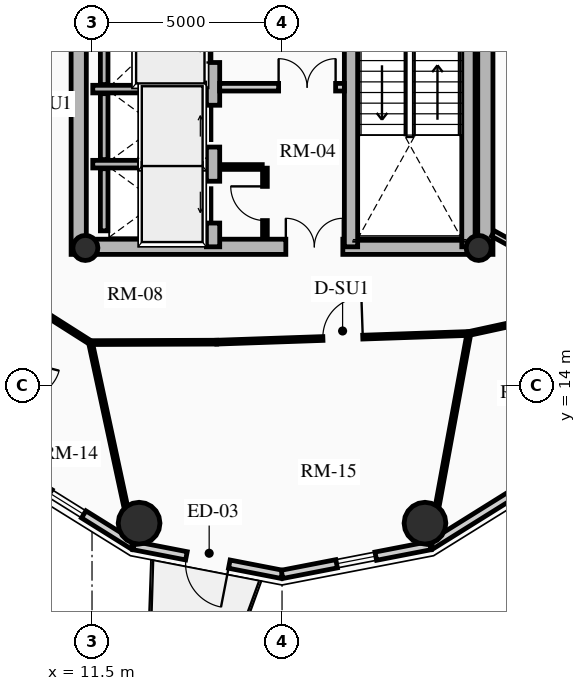
"""IFC4 building model, lengths in metres.
Left out: names, types, materials, properties, quantities, classifications, styles, units other than length and angle.
Written with IfcOpenShell. Run it as: python <this file> out.ifc"""

import sys

from ifc_helpers import new_model, si_unit, direction, frame, frame_2d, origin, origin_2d, place, context, subcontext, project, spatial, rectangle, circle, hollow_circle, extrude, source, transform, mapped, element, fill, save


model = new_model("IFC4")
c1 = context("Model", 3, precision=1e-05, world=origin(), true_north=direction((0.0, 1.0)))
c2 = subcontext(c1, "Body", "Model", "MODEL_VIEW")
j1 = project(units=[si_unit("LENGTHUNIT", "METRE"), si_unit("PLANEANGLEUNIT", "RADIAN")], contexts=[c1])
p1 = place(None, origin())
s1 = spatial("IfcSite", under=j1, at=p1, CompositionType="ELEMENT")
p2 = place(p1, origin())
s2 = spatial("IfcBuilding", under=s1, at=p2, CompositionType="ELEMENT")
p3 = place(p2, frame((0.0, 0.0, 232.45)))
s3 = spatial("IfcBuildingStorey", under=s2, at=p3, CompositionType="ELEMENT", Elevation=232.45)
for number, where, z_axis, x_axis in (
    (1, (11.15, 17.45, 0.0), (0.0, 0.0, 1.0), (0.0, 1.0, 0.0)),
    (2, (21.85, 17.45, 0.0), (0.0, 0.0, 1.0), (0.0, 1.0, 0.0)),
):
    element("IfcWall", number, at=place(p3, frame(where, z_axis=z_axis, x_axis=x_axis)), inside=s3, PredefinedType="SHEAR", context=c2, shape_type="SweptSolid", body=[
        extrude(rectangle(XDim=14.1, YDim=0.4, at=frame_2d((7.05, 0.0))), origin(), (0.0, 0.0, 1.0), 3.2),
    ])
p4 = place(p3, frame((11.15, 17.65, 0.0), z_axis=(0.0, 0.0, 1.0), x_axis=(1.0, 0.0, 0.0)))
e3 = element("IfcWall", 3, at=p4, inside=s3, PredefinedType="SHEAR", context=c2, shape_type="SweptSolid", body=[
    extrude(rectangle(XDim=10.7, YDim=0.4, at=frame_2d((5.35, 0.0))), origin(), (0.0, 0.0, 1.0), 3.2),
])
m1 = source(origin(), c2, "Body", "SweptSolid", [
    extrude(rectangle(XDim=1.5, YDim=2.02, at=frame_2d((0.75, 1.01))), frame((0.0, 0.21, 0.0), z_axis=(0.0, -1.0, 0.0), x_axis=(1.0, 0.0, 0.0)), (0.0, 0.0, 1.0), 0.42),
])
p5 = place(p4, frame((5.45, 0.0, 0.0)))
e4 = element("IfcOpeningElement", 4, at=p5, cuts=e3, PredefinedType="OPENING", context=c2, shape_type="MappedRepresentation", body=[
    mapped(m1, transform((0.0, 0.0, 0.0), x_axis=(1.0, 0.0, 0.0), y_axis=(0.0, 1.0, 0.0), z_axis=(0.0, 0.0, 1.0), scale=1.0)),
])
p6 = place(p3, frame((14.685, 17.65, 0.0), z_axis=(0.0, 0.0, 1.0), x_axis=(0.0, 1.0, 0.0)))
e5 = element("IfcWall", 5, at=p6, inside=s3, PredefinedType="SHEAR", context=c2, shape_type="SweptSolid", body=[
    extrude(rectangle(XDim=13.7, YDim=0.35, at=frame_2d((6.85, 0.0))), origin(), (0.0, 0.0, 1.0), 3.2),
])
m2 = source(origin(), c2, "Body", "SweptSolid", [
    extrude(rectangle(XDim=1.1, YDim=2.015, at=frame_2d((0.55, 1.007))), frame((0.0, 0.185, 0.0), z_axis=(0.0, -1.0, 0.0), x_axis=(1.0, 0.0, 0.0)), (0.0, 0.0, 1.0), 0.37),
])
p7 = place(p6, frame((4.85, 0.0, 0.0)))
e6 = element("IfcOpeningElement", 6, at=p7, cuts=e5, PredefinedType="OPENING", context=c2, shape_type="MappedRepresentation", body=[
    mapped(m2, transform((0.0, 0.0, 0.0), x_axis=(1.0, 0.0, 0.0), y_axis=(0.0, 1.0, 0.0), z_axis=(0.0, 0.0, 1.0), scale=1.0)),
])
p8 = place(p6, frame((0.625, 0.0, 0.0)))
e7 = element("IfcOpeningElement", 7, at=p8, cuts=e5, PredefinedType="OPENING", context=c2, shape_type="MappedRepresentation", body=[
    mapped(m2, transform((0.0, 0.0, 0.0), x_axis=(1.0, 0.0, 0.0), y_axis=(0.0, 1.0, 0.0), z_axis=(0.0, 0.0, 1.0), scale=1.0)),
])
p9 = place(p6, frame((2.625, 0.0, 0.0)))
e8 = element("IfcOpeningElement", 8, at=p9, cuts=e5, PredefinedType="OPENING", context=c2, shape_type="MappedRepresentation", body=[
    mapped(m2, transform((0.0, 0.0, 0.0), x_axis=(1.0, 0.0, 0.0), y_axis=(0.0, 1.0, 0.0), z_axis=(0.0, 0.0, 1.0), scale=1.0)),
])
m3 = source(origin(), c2, "Body", "SweptSolid", [
    extrude(rectangle(XDim=1.15, YDim=2.02, at=frame_2d((0.575, 1.01))), frame((0.0, 0.185, 0.0), z_axis=(0.0, -1.0, 0.0), x_axis=(1.0, 0.0, 0.0)), (0.0, 0.0, 1.0), 0.37),
])
p10 = place(p6, frame((7.27, 0.0, 0.0)))
e9 = element("IfcOpeningElement", 9, at=p10, cuts=e5, PredefinedType="OPENING", context=c2, shape_type="MappedRepresentation", body=[
    mapped(m3, transform((0.0, 0.0, 0.0), x_axis=(1.0, 0.0, 0.0), y_axis=(0.0, 1.0, 0.0), z_axis=(0.0, 0.0, 1.0), scale=1.0)),
])
p11 = place(p3, frame((18.315, 17.65, 0.0), z_axis=(0.0, 0.0, 1.0), x_axis=(0.0, 1.0, 0.0)))
e10 = element("IfcWall", 10, at=p11, inside=s3, PredefinedType="SHEAR", context=c2, shape_type="SweptSolid", body=[
    extrude(rectangle(XDim=9.6, YDim=0.35, at=frame_2d((4.8, 0.0))), origin(), (0.0, 0.0, 1.0), 3.2),
])
p12 = place(p11, frame((5.28, 0.0, 0.0)))
e11 = element("IfcOpeningElement", 11, at=p12, cuts=e10, PredefinedType="OPENING", context=c2, shape_type="MappedRepresentation", body=[
    mapped(m3, transform((0.0, 0.0, 0.0), x_axis=(1.0, 0.0, 0.0), y_axis=(0.0, 1.0, 0.0), z_axis=(0.0, 0.0, 1.0), scale=1.0)),
])
p13 = place(p3, frame((21.405, 17.65, 0.0), z_axis=(0.0, 0.0, 1.0), x_axis=(0.0, 1.0, 0.0)))
e12 = element("IfcWall", 12, at=p13, inside=s3, PredefinedType="SHEAR", context=c2, shape_type="SweptSolid", body=[
    extrude(rectangle(XDim=6.695, YDim=0.35, at=frame_2d((3.348, 0.0))), origin(), (0.0, 0.0, 1.0), 3.2),
])
for number, where, z_axis, x_axis in (
    (13, (11.325, 17.62, 0.0), (0.0, 0.0, 1.0), (1.0, 0.0, 0.0)),
    (14, (21.675, 17.62, 0.0), (0.0, 0.0, 1.0), (1.0, 0.0, 0.0)),
):
    element("IfcColumn", number, at=place(p3, frame(where, z_axis=z_axis, x_axis=x_axis)), inside=s3, PredefinedType="COLUMN", context=c2, shape_type="SweptSolid", body=[
        extrude(hollow_circle(Radius=0.33, WallThickness=0.025, at=origin_2d()), origin(), (0.0, 0.0, 1.0), 3.2),
    ])
for number, where, z_axis, x_axis in (
    (15, (12.739, 10.377, 0.0), (0.0, 0.0, 1.0), (1.0, 0.0, 0.0)),
    (16, (20.261, 10.377, 0.0), (0.0, 0.0, 1.0), (1.0, 0.0, 0.0)),
):
    element("IfcColumn", number, at=place(p3, frame(where, z_axis=z_axis, x_axis=x_axis)), inside=s3, PredefinedType="USERDEFINED", context=c2, shape_type="SweptSolid", body=[
        extrude(circle(Radius=0.55, at=origin_2d()), origin(), (0.0, 0.0, 1.0), 3.2),
    ])
p14 = place(p3, frame((12.597, 9.787, 0.0), z_axis=(0.0, 0.0, 1.0), x_axis=(-0.848318713376, 0.529485939886, 0.0)))
e17 = element("IfcWall", 17, at=p14, inside=s3, PredefinedType="SOLIDWALL", context=c2, shape_type="SweptSolid", body=[
    extrude(rectangle(XDim=4.15, YDim=0.22, at=frame_2d((2.075, 0.0))), origin(), (0.0, 0.0, 1.0), 2.402),
])
m4 = source(origin(), c2, "Body", "SweptSolid", [
    extrude(rectangle(XDim=1.05, YDim=1.3, at=frame_2d((0.525, 0.65))), frame((0.0, 0.12, 0.0), z_axis=(0.0, -1.0, 0.0), x_axis=(1.0, 0.0, 0.0)), (0.0, 0.0, 1.0), 0.24),
])
p15 = place(p14, frame((1.55, 0.0, 0.65)))
e18 = element("IfcOpeningElement", 18, at=p15, cuts=e17, PredefinedType="OPENING", context=c2, shape_type="MappedRepresentation", body=[
    mapped(m4, transform((0.0, 0.0, 0.0), x_axis=(1.0, 0.0, 0.0), y_axis=(0.0, 1.0, 0.0), z_axis=(0.0, 0.0, 1.0), scale=1.0)),
])
p16 = place(p3, frame((16.5, 9.03, 0.0), z_axis=(0.0, 0.0, 1.0), x_axis=(-0.981700307484, 0.190432419211, 0.0)))
e19 = element("IfcWall", 19, at=p16, inside=s3, PredefinedType="SOLIDWALL", context=c2, shape_type="SweptSolid", body=[
    extrude(rectangle(XDim=3.976, YDim=0.22, at=frame_2d((1.988, 0.0))), origin(), (0.0, 0.0, 1.0), 2.402),
])
m5 = source(origin(), c2, "Body", "SweptSolid", [
    extrude(rectangle(XDim=1.15, YDim=2.005, at=frame_2d((0.575, 1.002))), frame((0.0, 0.12, 0.0), z_axis=(0.0, -1.0, 0.0), x_axis=(1.0, 0.0, 0.0)), (0.0, 0.0, 1.0), 0.24),
])
p17 = place(p16, frame((1.413, 0.0, 0.0)))
e20 = element("IfcOpeningElement", 20, at=p17, cuts=e19, PredefinedType="OPENING", context=c2, shape_type="MappedRepresentation", body=[
    mapped(m5, transform((0.0, 0.0, 0.0), x_axis=(1.0, 0.0, 0.0), y_axis=(0.0, 1.0, 0.0), z_axis=(0.0, 0.0, 1.0), scale=1.0)),
])
p18 = place(p3, frame((20.403, 9.787, 0.0), z_axis=(0.0, 0.0, 1.0), x_axis=(-0.981700307484, -0.190432419211, 0.0)))
e21 = element("IfcWall", 21, at=p18, inside=s3, PredefinedType="SOLIDWALL", context=c2, shape_type="SweptSolid", body=[
    extrude(rectangle(XDim=3.976, YDim=0.22, at=frame_2d((1.988, 0.0))), origin(), (0.0, 0.0, 1.0), 2.402),
])
p19 = place(p18, frame((1.463, 0.0, 0.65)))
e22 = element("IfcOpeningElement", 22, at=p19, cuts=e21, PredefinedType="OPENING", context=c2, shape_type="MappedRepresentation", body=[
    mapped(m4, transform((0.0, 0.0, 0.0), x_axis=(1.0, 0.0, 0.0), y_axis=(0.0, 1.0, 0.0), z_axis=(0.0, 0.0, 1.0), scale=1.0)),
])
p20 = place(p3, frame((23.924, 11.985, 0.0), z_axis=(0.0, 0.0, 1.0), x_axis=(-0.848318713376, -0.529485939886, 0.0)))
e23 = element("IfcWall", 23, at=p20, inside=s3, PredefinedType="SOLIDWALL", context=c2, shape_type="SweptSolid", body=[
    extrude(rectangle(XDim=4.15, YDim=0.22, at=frame_2d((2.075, 0.0))), origin(), (0.0, 0.0, 1.0), 2.402),
])
p21 = place(p3, frame((11.52, 21.8, 0.0), z_axis=(0.0, 0.0, 1.0), x_axis=(1.0, 0.0, 0.0)))
e24 = element("IfcWall", 24, at=p21, inside=s3, PredefinedType="SHEAR", context=c2, shape_type="SweptSolid", body=[
    extrude(rectangle(XDim=2.97, YDim=0.2, at=frame_2d((1.485, 0.0))), origin(), (0.0, 0.0, 1.0), 3.2),
])
p22 = place(p3, frame((11.82, 21.92, 0.0), z_axis=(0.0, 0.0, 1.0), x_axis=(0.0, 1.0, 0.0)))
e25 = element("IfcWall", 25, at=p22, inside=s3, PredefinedType="SHEAR", context=c2, shape_type="SweptSolid", body=[
    extrude(rectangle(XDim=2.44, YDim=0.2, at=frame_2d((1.22, 0.0))), origin(), (0.0, 0.0, 1.0), 3.2),
])
p23 = place(p3, frame((11.52, 19.825, 0.0), z_axis=(0.0, 0.0, 1.0), x_axis=(1.0, 0.0, 0.0)))
e26 = element("IfcWall", 26, at=p23, inside=s3, PredefinedType="SHEAR", context=c2, shape_type="SweptSolid", body=[
    extrude(rectangle(XDim=2.97, YDim=0.2, at=frame_2d((1.485, 0.0))), origin(), (0.0, 0.0, 1.0), 3.2),
])
p24 = place(p3, frame((11.82, 19.945, 0.0), z_axis=(0.0, 0.0, 1.0), x_axis=(0.0, 1.0, 0.0)))
e27 = element("IfcWall", 27, at=p24, inside=s3, PredefinedType="SHEAR", context=c2, shape_type="SweptSolid", body=[
    extrude(rectangle(XDim=1.735, YDim=0.2, at=frame_2d((0.867, 0.0))), origin(), (0.0, 0.0, 1.0), 3.2),
])
p25 = place(p3, frame((11.82, 18.07, 0.0), z_axis=(0.0, 0.0, 1.0), x_axis=(0.0, 1.0, 0.0)))
e28 = element("IfcWall", 28, at=p25, inside=s3, PredefinedType="SHEAR", context=c2, shape_type="SweptSolid", body=[
    extrude(rectangle(XDim=1.635, YDim=0.2, at=frame_2d((0.817, 0.0))), origin(), (0.0, 0.0, 1.0), 3.2),
])
p26 = place(p3, frame((14.86, 21.85, 0.0), z_axis=(0.0, 0.0, 1.0), x_axis=(1.0, 0.0, 0.0)))
e29 = element("IfcWall", 29, at=p26, inside=s3, PredefinedType="PARTITIONING", context=c2, shape_type="SweptSolid", body=[
    extrude(rectangle(XDim=3.28, YDim=0.2, at=frame_2d((1.64, 0.0))), origin(), (0.0, 0.0, 1.0), 2.765),
])
m6 = source(origin(), c2, "Body", "SweptSolid", [
    extrude(rectangle(XDim=1.5, YDim=2.02, at=frame_2d((0.75, 1.01))), frame((0.0, 0.11, 0.0), z_axis=(0.0, -1.0, 0.0), x_axis=(1.0, 0.0, 0.0)), (0.0, 0.0, 1.0), 0.22),
])
p27 = place(p26, frame((1.55, 0.0, 0.0)))
e30 = element("IfcOpeningElement", 30, at=p27, cuts=e29, PredefinedType="OPENING", context=c2, shape_type="MappedRepresentation", body=[
    mapped(m6, transform((0.0, 0.0, 0.0), x_axis=(1.0, 0.0, 0.0), y_axis=(0.0, 1.0, 0.0), z_axis=(0.0, 0.0, 1.0), scale=1.0)),
])
p28 = place(p3, frame((16.05, 17.92, 0.0), z_axis=(0.0, 0.0, 1.0), x_axis=(0.0, 1.0, 0.0)))
e31 = element("IfcWall", 31, at=p28, inside=s3, PredefinedType="PARTITIONING", context=c2, shape_type="SweptSolid", body=[
    extrude(rectangle(XDim=1.8, YDim=0.125, at=frame_2d((0.9, 0.0))), origin(), (0.0, 0.0, 1.0), 2.765),
])
m7 = source(origin(), c2, "Body", "SweptSolid", [
    extrude(rectangle(XDim=0.9, YDim=2.005, at=frame_2d((0.45, 1.002))), frame((0.0, 0.073, 0.0), z_axis=(0.0, -1.0, 0.0), x_axis=(1.0, 0.0, 0.0)), (0.0, 0.0, 1.0), 0.145),
])
p29 = place(p28, frame((0.42, 0.0, 0.0)))
e32 = element("IfcOpeningElement", 32, at=p29, cuts=e31, PredefinedType="OPENING", context=c2, shape_type="MappedRepresentation", body=[
    mapped(m7, transform((0.0, 0.0, 0.0), x_axis=(1.0, 0.0, 0.0), y_axis=(0.0, 1.0, 0.0), z_axis=(0.0, 0.0, 1.0), scale=1.0)),
])
p30 = place(p3, frame((14.88, 19.75, 0.0), z_axis=(0.0, 0.0, 1.0), x_axis=(1.0, 0.0, 0.0)))
e33 = element("IfcWall", 33, at=p30, inside=s3, PredefinedType="PARTITIONING", context=c2, shape_type="SweptSolid", body=[
    extrude(rectangle(XDim=1.1, YDim=0.125, at=frame_2d((0.55, 0.0))), origin(), (0.0, 0.0, 1.0), 2.765),
])
p31 = place(p3, frame((10.115, 15.983, 0.0), z_axis=(0.0, 0.0, 1.0), x_axis=(0.843995849351, -0.536349705209, 0.0)))
e34 = element("IfcWall", 34, at=p31, inside=s3, PredefinedType="MOVABLE", context=c2, shape_type="SweptSolid", body=[
    extrude(rectangle(XDim=1.593, YDim=0.1, at=frame_2d((0.796, 0.0))), origin(), (0.0, 0.0, 1.0), 2.335),
])
p32 = place(p3, frame((11.46, 15.129, 0.0), z_axis=(0.0, 0.0, 1.0), x_axis=(0.999993513287, 0.003601858435, 0.0)))
e35 = element("IfcWall", 35, at=p32, inside=s3, PredefinedType="MOVABLE", context=c2, shape_type="SweptSolid", body=[
    extrude(rectangle(XDim=3.321, YDim=0.1, at=frame_2d((1.661, 0.0))), origin(), (0.0, 0.0, 1.0), 2.402),
])
p33 = place(p3, frame((14.781, 15.141, 0.0), z_axis=(0.0, 0.0, 1.0), x_axis=(0.999407918707, 0.034406569513, 0.0)))
e36 = element("IfcWall", 36, at=p33, inside=s3, PredefinedType="MOVABLE", context=c2, shape_type="SweptSolid", body=[
    extrude(rectangle(XDim=6.642, YDim=0.1, at=frame_2d((3.321, 0.0))), origin(), (0.0, 0.0, 1.0), 2.335),
])
m8 = source(origin(), c2, "Body", "SweptSolid", [
    extrude(rectangle(XDim=1.05, YDim=2.015, at=frame_2d((0.525, 1.007))), frame((0.0, 0.06, 0.0), z_axis=(0.0, -1.0, 0.0), x_axis=(1.0, 0.0, 0.0)), (0.0, 0.0, 1.0), 0.12),
])
p34 = place(p33, frame((2.796, 0.0, 0.0)))
e37 = element("IfcOpeningElement", 37, at=p34, cuts=e36, PredefinedType="OPENING", context=c2, shape_type="MappedRepresentation", body=[
    mapped(m8, transform((0.0, 0.0, 0.0), x_axis=(1.0, 0.0, 0.0), y_axis=(0.0, 1.0, 0.0), z_axis=(0.0, 0.0, 1.0), scale=1.0)),
])
p35 = place(p3, frame((21.419, 15.369, 0.0), z_axis=(0.0, 0.0, 1.0), x_axis=(0.977192701953, 0.212354475464, 0.0)))
e38 = element("IfcWall", 38, at=p35, inside=s3, PredefinedType="MOVABLE", context=c2, shape_type="SweptSolid", body=[
    extrude(rectangle(XDim=1.888, YDim=0.1, at=frame_2d((0.944, 0.0))), origin(), (0.0, 0.0, 1.0), 2.335),
])
p36 = place(p3, frame((11.46, 15.129, 0.0), z_axis=(0.0, 0.0, 1.0), x_axis=(0.210058897642, -0.977688733453, 0.0)))
e39 = element("IfcWall", 39, at=p36, inside=s3, PredefinedType="MOVABLE", context=c2, shape_type="SweptSolid", body=[
    extrude(rectangle(XDim=5.444, YDim=0.1, at=frame_2d((2.722, 0.0))), origin(), (0.0, 0.0, 1.0), 2.402),
])
p37 = place(p3, frame((21.419, 15.369, 0.0), z_axis=(0.0, 0.0, 1.0), x_axis=(-0.180685606423, -0.98354090491, 0.0)))
e40 = element("IfcWall", 40, at=p37, inside=s3, PredefinedType="MOVABLE", context=c2, shape_type="SweptSolid", body=[
    extrude(rectangle(XDim=5.656, YDim=0.1, at=frame_2d((2.828, 0.0))), origin(), (0.0, 0.0, 1.0), 2.402),
])
p38 = place(p3, frame((22.05, 18.0, 0.0), z_axis=(0.0, 0.0, 1.0), x_axis=(0.877252891813, -0.480028503118, 0.0)))
e41 = element("IfcWall", 41, at=p38, inside=s3, PredefinedType="PARTITIONING", context=c2, shape_type="SweptSolid", body=[
    extrude(rectangle(XDim=2.282, YDim=0.16, at=frame_2d((1.141, 0.0))), origin(), (0.0, 0.0, 1.0), 2.335),
])
m9 = source(origin(), c2, "Body", "SweptSolid", [
    extrude(rectangle(XDim=1.05, YDim=2.015, at=frame_2d((0.525, 1.007))), frame((0.0, 0.09, 0.0), z_axis=(0.0, -1.0, 0.0), x_axis=(1.0, 0.0, 0.0)), (0.0, 0.0, 1.0), 0.18),
])
p39 = place(p38, frame((1.032, 0.0, 0.0)))
e42 = element("IfcOpeningElement", 42, at=p39, cuts=e41, PredefinedType="OPENING", context=c2, shape_type="MappedRepresentation", body=[
    mapped(m9, transform((0.0, 0.0, 0.0), x_axis=(1.0, 0.0, 0.0), y_axis=(0.0, 1.0, 0.0), z_axis=(0.0, 0.0, 1.0), scale=1.0)),
])
m10 = source(origin(), c2, "Body", "SweptSolid", [
    extrude(rectangle(XDim=1.05, YDim=1.3, at=frame_2d((0.525, 0.65))), frame((0.0, 0.03, 0.0), z_axis=(0.0, -1.0, 0.0), x_axis=(1.0, 0.0, 0.0)), (0.0, 0.0, 1.0), 0.06),
])
p40 = place(p15, origin())
e43 = element("IfcWindow", 43, at=p40, inside=s3, PartitioningType="SINGLE_PANEL", PredefinedType="WINDOW", context=c2, shape_type="MappedRepresentation", body=[
    mapped(m10, transform((0.0, 0.0, 0.0), x_axis=(1.0, 0.0, 0.0), y_axis=(0.0, 1.0, 0.0), z_axis=(0.0, 0.0, 1.0), scale=1.0)),
])
fill(e18, e43)
m11 = source(origin(), c2, "Body", "SweptSolid", [
    extrude(rectangle(XDim=1.15, YDim=2.005, at=frame_2d((0.575, 1.002))), frame((0.0, 0.025, 0.0), z_axis=(0.0, -1.0, 0.0), x_axis=(1.0, 0.0, 0.0)), (0.0, 0.0, 1.0), 0.05),
])
p41 = place(p17, origin())
e44 = element("IfcDoor", 44, at=p41, inside=s3, OperationType="SINGLE_SWING_LEFT", PredefinedType="DOOR", context=c2, shape_type="MappedRepresentation", body=[
    mapped(m11, transform((0.0, 0.0, 0.0), x_axis=(1.0, 0.0, 0.0), y_axis=(0.0, 1.0, 0.0), z_axis=(0.0, 0.0, 1.0), scale=1.0)),
])
fill(e20, e44)
p42 = place(p19, origin())
e45 = element("IfcWindow", 45, at=p42, inside=s3, PartitioningType="SINGLE_PANEL", PredefinedType="WINDOW", context=c2, shape_type="MappedRepresentation", body=[
    mapped(m10, transform((0.0, 0.0, 0.0), x_axis=(1.0, 0.0, 0.0), y_axis=(0.0, 1.0, 0.0), z_axis=(0.0, 0.0, 1.0), scale=1.0)),
])
fill(e22, e45)
m12 = source(origin(), c2, "Body", "SweptSolid", [
    extrude(rectangle(XDim=1.1, YDim=2.015, at=frame_2d((0.55, 1.007))), frame((0.0, 0.025, 0.0), z_axis=(0.0, -1.0, 0.0), x_axis=(1.0, 0.0, 0.0)), (0.0, 0.0, 1.0), 0.05),
])
p43 = place(p7, origin())
e46 = element("IfcDoor", 46, at=p43, inside=s3, OperationType="SLIDING_TO_LEFT", PredefinedType="DOOR", context=c2, shape_type="MappedRepresentation", body=[
    mapped(m12, transform((0.0, 0.0, 0.0), x_axis=(1.0, 0.0, 0.0), y_axis=(0.0, 1.0, 0.0), z_axis=(0.0, 0.0, 1.0), scale=1.0)),
])
fill(e6, e46)
p44 = place(p8, origin())
e47 = element("IfcDoor", 47, at=p44, inside=s3, OperationType="SLIDING_TO_LEFT", PredefinedType="DOOR", context=c2, shape_type="MappedRepresentation", body=[
    mapped(m12, transform((0.0, 0.0, 0.0), x_axis=(1.0, 0.0, 0.0), y_axis=(0.0, 1.0, 0.0), z_axis=(0.0, 0.0, 1.0), scale=1.0)),
])
fill(e7, e47)
p45 = place(p9, origin())
e48 = element("IfcDoor", 48, at=p45, inside=s3, OperationType="SLIDING_TO_RIGHT", PredefinedType="DOOR", context=c2, shape_type="MappedRepresentation", body=[
    mapped(m12, transform((0.0, 0.0, 0.0), x_axis=(1.0, 0.0, 0.0), y_axis=(0.0, 1.0, 0.0), z_axis=(0.0, 0.0, 1.0), scale=1.0)),
])
fill(e8, e48)
m13 = source(origin(), c2, "Body", "SweptSolid", [
    extrude(rectangle(XDim=1.5, YDim=2.02, at=frame_2d((0.75, 1.01))), frame((0.0, 0.025, 0.0), z_axis=(0.0, -1.0, 0.0), x_axis=(1.0, 0.0, 0.0)), (0.0, 0.0, 1.0), 0.05),
])
p46 = place(p5, origin())
e49 = element("IfcDoor", 49, at=p46, inside=s3, OperationType="DOUBLE_DOOR_SINGLE_SWING", PredefinedType="DOOR", context=c2, shape_type="MappedRepresentation", body=[
    mapped(m13, transform((0.0, 0.0, 0.0), x_axis=(1.0, 0.0, 0.0), y_axis=(0.0, 1.0, 0.0), z_axis=(0.0, 0.0, 1.0), scale=1.0)),
])
fill(e4, e49)
p47 = place(p27, origin())
e50 = element("IfcDoor", 50, at=p47, inside=s3, OperationType="DOUBLE_DOOR_SINGLE_SWING", PredefinedType="DOOR", context=c2, shape_type="MappedRepresentation", body=[
    mapped(m13, transform((0.0, 0.0, 0.0), x_axis=(1.0, 0.0, 0.0), y_axis=(0.0, 1.0, 0.0), z_axis=(0.0, 0.0, 1.0), scale=1.0)),
])
fill(e30, e50)
m14 = source(origin(), c2, "Body", "SweptSolid", [
    extrude(rectangle(XDim=0.9, YDim=2.005, at=frame_2d((0.45, 1.002))), frame((0.0, 0.025, 0.0), z_axis=(0.0, -1.0, 0.0), x_axis=(1.0, 0.0, 0.0)), (0.0, 0.0, 1.0), 0.05),
])
p48 = place(p29, origin())
e51 = element("IfcDoor", 51, at=p48, inside=s3, OperationType="SINGLE_SWING_RIGHT", PredefinedType="DOOR", context=c2, shape_type="MappedRepresentation", body=[
    mapped(m14, transform((0.0, 0.0, 0.0), x_axis=(1.0, 0.0, 0.0), y_axis=(0.0, 1.0, 0.0), z_axis=(0.0, 0.0, 1.0), scale=1.0)),
])
fill(e32, e51)
m15 = source(origin(), c2, "Body", "SweptSolid", [
    extrude(rectangle(XDim=1.05, YDim=2.015, at=frame_2d((0.525, 1.007))), frame((0.0, 0.025, 0.0), z_axis=(0.0, -1.0, 0.0), x_axis=(1.0, 0.0, 0.0)), (0.0, 0.0, 1.0), 0.05),
])
p49 = place(p34, origin())
e52 = element("IfcDoor", 52, at=p49, inside=s3, OperationType="SINGLE_SWING_RIGHT", PredefinedType="DOOR", context=c2, shape_type="MappedRepresentation", body=[
    mapped(m15, transform((0.0, 0.0, 0.0), x_axis=(1.0, 0.0, 0.0), y_axis=(0.0, 1.0, 0.0), z_axis=(0.0, 0.0, 1.0), scale=1.0)),
])
fill(e37, e52)
save(model, sys.argv[1])
